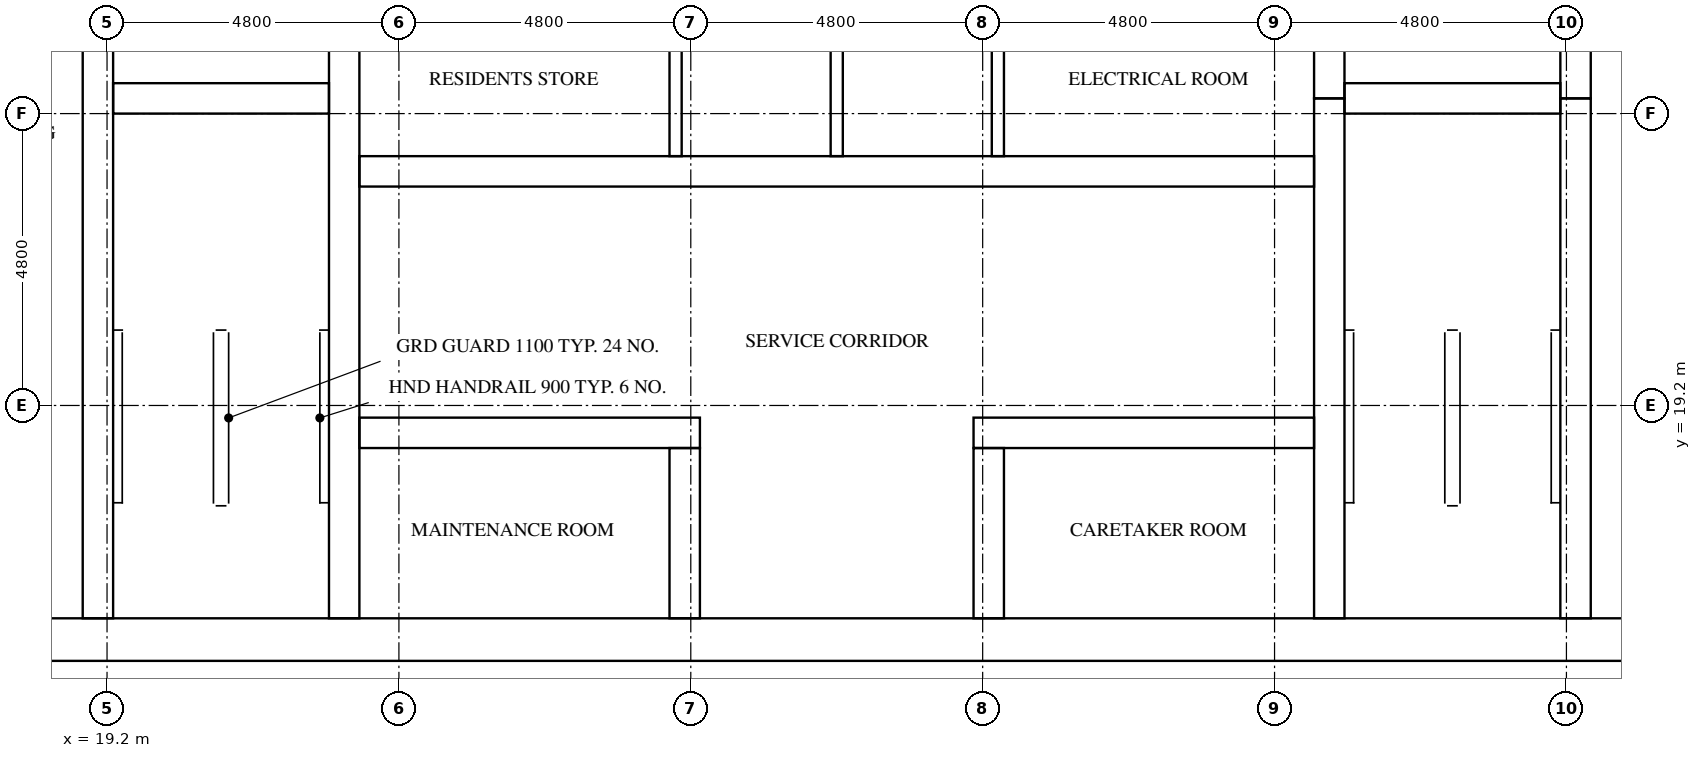
"""IFC4 building model, lengths in metres.
Left out: names, types, materials, properties, quantities, classifications, styles, units other than length and angle.
Written with IfcOpenShell. Run it as: python <this file> out.ifc"""

import sys

from ifc_helpers import new_model, si_unit, direction, frame, frame_2d, origin, place, context, subcontext, project, spatial, rectangle, extrude, element, fill, save


model = new_model("IFC4")
c1 = context("Model", 3, precision=1e-05, world=origin(), true_north=direction((0.0, 1.0)))
c2 = subcontext(c1, "Body", "Model", "MODEL_VIEW")
j1 = project(units=[si_unit("LENGTHUNIT", "METRE"), si_unit("PLANEANGLEUNIT", "RADIAN")], contexts=[c1])
p1 = place(None, origin())
s1 = spatial("IfcSite", under=j1, at=p1, CompositionType="ELEMENT")
p2 = place(p1, origin())
s2 = spatial("IfcBuilding", under=s1, at=p2, CompositionType="ELEMENT")
p3 = place(p2, frame((0.0, 0.0, 185.9)))
s3 = spatial("IfcBuildingStorey", under=s2, at=p3, CompositionType="ELEMENT", Elevation=185.9)
p4 = place(p3, frame((15.0, 15.35, 0.0), z_axis=(0.0, 0.0, 1.0), x_axis=(1.0, 0.0, 0.0)))
e1 = element("IfcWall", 1, at=p4, inside=s3, PredefinedType="SHEAR", context=c2, shape_type="SweptSolid", body=[
    extrude(rectangle(XDim=32.4, YDim=0.7, at=frame_2d((16.2, 0.0))), origin(), (0.0, 0.0, 1.0), 3.2),
])
p5 = place(p4, frame((15.3, 0.0, 0.0)))
e2 = element("IfcOpeningElement", 2, at=p5, cuts=e1, PredefinedType="OPENING", context=c2, shape_type="SweptSolid", body=[
    extrude(rectangle(XDim=1.8, YDim=2.1, at=frame_2d((0.9, 1.05))), frame((0.0, 0.36, 0.0), z_axis=(0.0, -1.0, 0.0), x_axis=(1.0, 0.0, 0.0)), (0.0, 0.0, 1.0), 0.72),
])
p6 = place(p3, frame((19.05, 15.7, 0.0), z_axis=(0.0, 0.0, 1.0), x_axis=(0.0, 1.0, 0.0)))
e3 = element("IfcWall", 3, at=p6, inside=s3, PredefinedType="SHEAR", context=c2, shape_type="SweptSolid", body=[
    extrude(rectangle(XDim=15.3, YDim=0.5, at=frame_2d((7.65, 0.0))), origin(), (0.0, 0.0, 1.0), 3.2),
])
p7 = place(p6, frame((9.75, 0.0, 0.0)))
e4 = element("IfcOpeningElement", 4, at=p7, cuts=e3, PredefinedType="OPENING", context=c2, shape_type="SweptSolid", body=[
    extrude(rectangle(XDim=1.1, YDim=2.1, at=frame_2d((0.55, 1.05))), frame((0.0, 0.26, 0.0), z_axis=(0.0, -1.0, 0.0), x_axis=(1.0, 0.0, 0.0)), (0.0, 0.0, 1.0), 0.52),
])
p8 = place(p6, frame((13.25, 0.0, 0.0)))
e5 = element("IfcOpeningElement", 5, at=p8, cuts=e3, PredefinedType="OPENING", context=c2, shape_type="SweptSolid", body=[
    extrude(rectangle(XDim=1.1, YDim=2.1, at=frame_2d((0.55, 1.05))), frame((0.0, 0.26, 0.0), z_axis=(0.0, -1.0, 0.0), x_axis=(1.0, 0.0, 0.0)), (0.0, 0.0, 1.0), 0.52),
])
p9 = place(p6, frame((0.5, 0.0, 0.0)))
e6 = element("IfcOpeningElement", 6, at=p9, cuts=e3, PredefinedType="OPENING", context=c2, shape_type="SweptSolid", body=[
    extrude(rectangle(XDim=1.2, YDim=2.1, at=frame_2d((0.6, 1.05))), frame((0.0, 0.26, 0.0), z_axis=(0.0, -1.0, 0.0), x_axis=(1.0, 0.0, 0.0)), (0.0, 0.0, 1.0), 0.52),
])
p10 = place(p3, frame((23.1, 15.7, 0.0), z_axis=(0.0, 0.0, 1.0), x_axis=(0.0, 1.0, 0.0)))
e7 = element("IfcWall", 7, at=p10, inside=s3, PredefinedType="SHEAR", context=c2, shape_type="SweptSolid", body=[
    extrude(rectangle(XDim=21.4, YDim=0.5, at=frame_2d((10.7, 0.0))), origin(), (0.0, 0.0, 1.0), 3.2),
])
p11 = place(p3, frame((39.3, 15.7, 0.0), z_axis=(0.0, 0.0, 1.0), x_axis=(0.0, 1.0, 0.0)))
e8 = element("IfcWall", 8, at=p11, inside=s3, PredefinedType="SHEAR", context=c2, shape_type="SweptSolid", body=[
    extrude(rectangle(XDim=8.55, YDim=0.5, at=frame_2d((4.275, 0.0))), origin(), (0.0, 0.0, 1.0), 3.2),
])
p12 = place(p3, frame((39.3, 24.25, 0.0), z_axis=(0.0, 0.0, 1.0), x_axis=(0.0, 1.0, 0.0)))
e9 = element("IfcWall", 9, at=p12, inside=s3, PredefinedType="SHEAR", context=c2, shape_type="SweptSolid", body=[
    extrude(rectangle(XDim=3.5, YDim=0.5, at=frame_2d((1.75, 0.0))), origin(), (0.0, 0.0, 1.0), 3.2),
])
p13 = place(p3, frame((43.35, 15.7, 0.0), z_axis=(0.0, 0.0, 1.0), x_axis=(0.0, 1.0, 0.0)))
e10 = element("IfcWall", 10, at=p13, inside=s3, PredefinedType="SHEAR", context=c2, shape_type="SweptSolid", body=[
    extrude(rectangle(XDim=8.55, YDim=0.5, at=frame_2d((4.275, 0.0))), origin(), (0.0, 0.0, 1.0), 3.2),
])
p14 = place(p13, frame((0.5, 0.0, 0.0)))
e11 = element("IfcOpeningElement", 11, at=p14, cuts=e10, PredefinedType="OPENING", context=c2, shape_type="SweptSolid", body=[
    extrude(rectangle(XDim=1.2, YDim=2.1, at=frame_2d((0.6, 1.05))), frame((0.0, 0.26, 0.0), z_axis=(0.0, -1.0, 0.0), x_axis=(1.0, 0.0, 0.0)), (0.0, 0.0, 1.0), 0.52),
])
p15 = place(p3, frame((43.35, 24.25, 0.0), z_axis=(0.0, 0.0, 1.0), x_axis=(0.0, 1.0, 0.0)))
e12 = element("IfcWall", 12, at=p15, inside=s3, PredefinedType="SHEAR", context=c2, shape_type="SweptSolid", body=[
    extrude(rectangle(XDim=3.5, YDim=0.5, at=frame_2d((1.75, 0.0))), origin(), (0.0, 0.0, 1.0), 3.2),
])
p16 = place(p15, frame((1.2, 0.0, 0.0)))
e13 = element("IfcOpeningElement", 13, at=p16, cuts=e12, PredefinedType="OPENING", context=c2, shape_type="SweptSolid", body=[
    extrude(rectangle(XDim=1.1, YDim=2.1, at=frame_2d((0.55, 1.05))), frame((0.0, 0.26, 0.0), z_axis=(0.0, -1.0, 0.0), x_axis=(1.0, 0.0, 0.0)), (0.0, 0.0, 1.0), 0.52),
])
for number, where, z_axis, x_axis in (
    (14, (19.3, 24.25, 0.0), (0.0, 0.0, 1.0), (1.0, 0.0, 0.0)),
    (15, (39.55, 24.25, 0.0), (0.0, 0.0, 1.0), (1.0, 0.0, 0.0)),
):
    element("IfcWall", number, at=place(p3, frame(where, z_axis=z_axis, x_axis=x_axis)), inside=s3, PredefinedType="SHEAR", context=c2, shape_type="SweptSolid", body=[
        extrude(rectangle(XDim=3.55, YDim=0.5, at=frame_2d((1.775, 0.0))), origin(), (0.0, 0.0, 1.0), 3.2),
    ])
p17 = place(p3, frame((23.35, 18.75, 0.0), z_axis=(0.0, 0.0, 1.0), x_axis=(1.0, 0.0, 0.0)))
e16 = element("IfcWall", 16, at=p17, inside=s3, PredefinedType="SHEAR", context=c2, shape_type="SweptSolid", body=[
    extrude(rectangle(XDim=5.6, YDim=0.5, at=frame_2d((2.8, 0.0))), origin(), (0.0, 0.0, 1.0), 3.2),
])
p18 = place(p17, frame((2.05, 0.0, 0.0)))
e17 = element("IfcOpeningElement", 17, at=p18, cuts=e16, PredefinedType="OPENING", context=c2, shape_type="SweptSolid", body=[
    extrude(rectangle(XDim=1.0, YDim=2.1, at=frame_2d((0.5, 1.05))), frame((0.0, 0.26, 0.0), z_axis=(0.0, -1.0, 0.0), x_axis=(1.0, 0.0, 0.0)), (0.0, 0.0, 1.0), 0.52),
])
p19 = place(p3, frame((33.45, 18.75, 0.0), z_axis=(0.0, 0.0, 1.0), x_axis=(1.0, 0.0, 0.0)))
e18 = element("IfcWall", 18, at=p19, inside=s3, PredefinedType="SHEAR", context=c2, shape_type="SweptSolid", body=[
    extrude(rectangle(XDim=5.6, YDim=0.5, at=frame_2d((2.8, 0.0))), origin(), (0.0, 0.0, 1.0), 3.2),
])
p20 = place(p19, frame((2.55, 0.0, 0.0)))
e19 = element("IfcOpeningElement", 19, at=p20, cuts=e18, PredefinedType="OPENING", context=c2, shape_type="SweptSolid", body=[
    extrude(rectangle(XDim=1.0, YDim=2.1, at=frame_2d((0.5, 1.05))), frame((0.0, 0.26, 0.0), z_axis=(0.0, -1.0, 0.0), x_axis=(1.0, 0.0, 0.0)), (0.0, 0.0, 1.0), 0.52),
])
p21 = place(p3, frame((23.35, 23.05, 0.0), z_axis=(0.0, 0.0, 1.0), x_axis=(1.0, 0.0, 0.0)))
e20 = element("IfcWall", 20, at=p21, inside=s3, PredefinedType="SHEAR", context=c2, shape_type="SweptSolid", body=[
    extrude(rectangle(XDim=15.7, YDim=0.5, at=frame_2d((7.85, 0.0))), origin(), (0.0, 0.0, 1.0), 3.2),
])
p22 = place(p21, frame((2.05, 0.0, 0.0)))
e21 = element("IfcOpeningElement", 21, at=p22, cuts=e20, PredefinedType="OPENING", context=c2, shape_type="SweptSolid", body=[
    extrude(rectangle(XDim=1.0, YDim=2.1, at=frame_2d((0.5, 1.05))), frame((0.0, 0.26, 0.0), z_axis=(0.0, -1.0, 0.0), x_axis=(1.0, 0.0, 0.0)), (0.0, 0.0, 1.0), 0.52),
])
p23 = place(p21, frame((12.65, 0.0, 0.0)))
e22 = element("IfcOpeningElement", 22, at=p23, cuts=e20, PredefinedType="OPENING", context=c2, shape_type="SweptSolid", body=[
    extrude(rectangle(XDim=1.0, YDim=2.1, at=frame_2d((0.5, 1.05))), frame((0.0, 0.26, 0.0), z_axis=(0.0, -1.0, 0.0), x_axis=(1.0, 0.0, 0.0)), (0.0, 0.0, 1.0), 0.52),
])
for number, where, z_axis, x_axis in (
    (23, (28.7, 15.7, 0.0), (0.0, 0.0, 1.0), (0.0, 1.0, 0.0)),
    (24, (33.7, 15.7, 0.0), (0.0, 0.0, 1.0), (0.0, 1.0, 0.0)),
):
    element("IfcWall", number, at=place(p3, frame(where, z_axis=z_axis, x_axis=x_axis)), inside=s3, PredefinedType="SHEAR", context=c2, shape_type="SweptSolid", body=[
        extrude(rectangle(XDim=2.8, YDim=0.5, at=frame_2d((1.4, 0.0))), origin(), (0.0, 0.0, 1.0), 3.2),
    ])
for number, where, z_axis, x_axis in (
    (25, (28.55, 23.3, 0.0), (0.0, 0.0, 1.0), (0.0, 1.0, 0.0)),
    (26, (31.2, 23.3, 0.0), (0.0, 0.0, 1.0), (0.0, 1.0, 0.0)),
    (27, (33.85, 23.3, 0.0), (0.0, 0.0, 1.0), (0.0, 1.0, 0.0)),
):
    element("IfcWall", number, at=place(p3, frame(where, z_axis=z_axis, x_axis=x_axis)), inside=s3, PredefinedType="SOLIDWALL", context=c2, shape_type="SweptSolid", body=[
        extrude(rectangle(XDim=2.6, YDim=0.2, at=frame_2d((1.3, 0.0))), origin(), (0.0, 0.0, 1.0), 3.2),
    ])
p24 = place(p9, frame((1.2, 0.0, 0.0), z_axis=(0.0, 0.0, 1.0), x_axis=(-1.0, 0.0, 0.0)))
e28 = element("IfcDoor", 28, at=p24, inside=s3, OperationType="SINGLE_SWING_RIGHT", PredefinedType="DOOR", context=c2, shape_type="SweptSolid", body=[
    extrude(rectangle(XDim=1.2, YDim=2.1, at=frame_2d((0.6, 1.05))), frame((0.0, 0.025, 0.0), z_axis=(0.0, -1.0, 0.0), x_axis=(1.0, 0.0, 0.0)), (0.0, 0.0, 1.0), 0.05),
])
fill(e6, e28)
p25 = place(p14, origin())
e29 = element("IfcDoor", 29, at=p25, inside=s3, OperationType="SINGLE_SWING_LEFT", PredefinedType="DOOR", context=c2, shape_type="SweptSolid", body=[
    extrude(rectangle(XDim=1.2, YDim=2.1, at=frame_2d((0.6, 1.05))), frame((0.0, 0.025, 0.0), z_axis=(0.0, -1.0, 0.0), x_axis=(1.0, 0.0, 0.0)), (0.0, 0.0, 1.0), 0.05),
])
fill(e11, e29)
p26 = place(p5, frame((1.8, 0.0, 0.0), z_axis=(0.0, 0.0, 1.0), x_axis=(-1.0, 0.0, 0.0)))
e30 = element("IfcDoor", 30, at=p26, inside=s3, OperationType="DOUBLE_DOOR_SINGLE_SWING", PredefinedType="DOOR", context=c2, shape_type="SweptSolid", body=[
    extrude(rectangle(XDim=1.8, YDim=2.1, at=frame_2d((0.9, 1.05))), frame((0.0, 0.025, 0.0), z_axis=(0.0, -1.0, 0.0), x_axis=(1.0, 0.0, 0.0)), (0.0, 0.0, 1.0), 0.05),
])
fill(e2, e30)
p27 = place(p22, frame((1.0, 0.0, 0.0), z_axis=(0.0, 0.0, 1.0), x_axis=(-1.0, 0.0, 0.0)))
e31 = element("IfcDoor", 31, at=p27, inside=s3, OperationType="SINGLE_SWING_LEFT", PredefinedType="DOOR", context=c2, shape_type="SweptSolid", body=[
    extrude(rectangle(XDim=1.0, YDim=2.1, at=frame_2d((0.5, 1.05))), frame((0.0, 0.025, 0.0), z_axis=(0.0, -1.0, 0.0), x_axis=(1.0, 0.0, 0.0)), (0.0, 0.0, 1.0), 0.05),
])
fill(e21, e31)
p28 = place(p23, frame((1.0, 0.0, 0.0), z_axis=(0.0, 0.0, 1.0), x_axis=(-1.0, 0.0, 0.0)))
e32 = element("IfcDoor", 32, at=p28, inside=s3, OperationType="SINGLE_SWING_RIGHT", PredefinedType="DOOR", context=c2, shape_type="SweptSolid", body=[
    extrude(rectangle(XDim=1.0, YDim=2.1, at=frame_2d((0.5, 1.05))), frame((0.0, 0.025, 0.0), z_axis=(0.0, -1.0, 0.0), x_axis=(1.0, 0.0, 0.0)), (0.0, 0.0, 1.0), 0.05),
])
fill(e22, e32)
p29 = place(p18, origin())
e33 = element("IfcDoor", 33, at=p29, inside=s3, OperationType="SINGLE_SWING_LEFT", PredefinedType="DOOR", context=c2, shape_type="SweptSolid", body=[
    extrude(rectangle(XDim=1.0, YDim=2.1, at=frame_2d((0.5, 1.05))), frame((0.0, 0.025, 0.0), z_axis=(0.0, -1.0, 0.0), x_axis=(1.0, 0.0, 0.0)), (0.0, 0.0, 1.0), 0.05),
])
fill(e17, e33)
p30 = place(p20, origin())
e34 = element("IfcDoor", 34, at=p30, inside=s3, OperationType="SINGLE_SWING_RIGHT", PredefinedType="DOOR", context=c2, shape_type="SweptSolid", body=[
    extrude(rectangle(XDim=1.0, YDim=2.1, at=frame_2d((0.5, 1.05))), frame((0.0, 0.025, 0.0), z_axis=(0.0, -1.0, 0.0), x_axis=(1.0, 0.0, 0.0)), (0.0, 0.0, 1.0), 0.05),
])
fill(e19, e34)
save(model, sys.argv[1])
